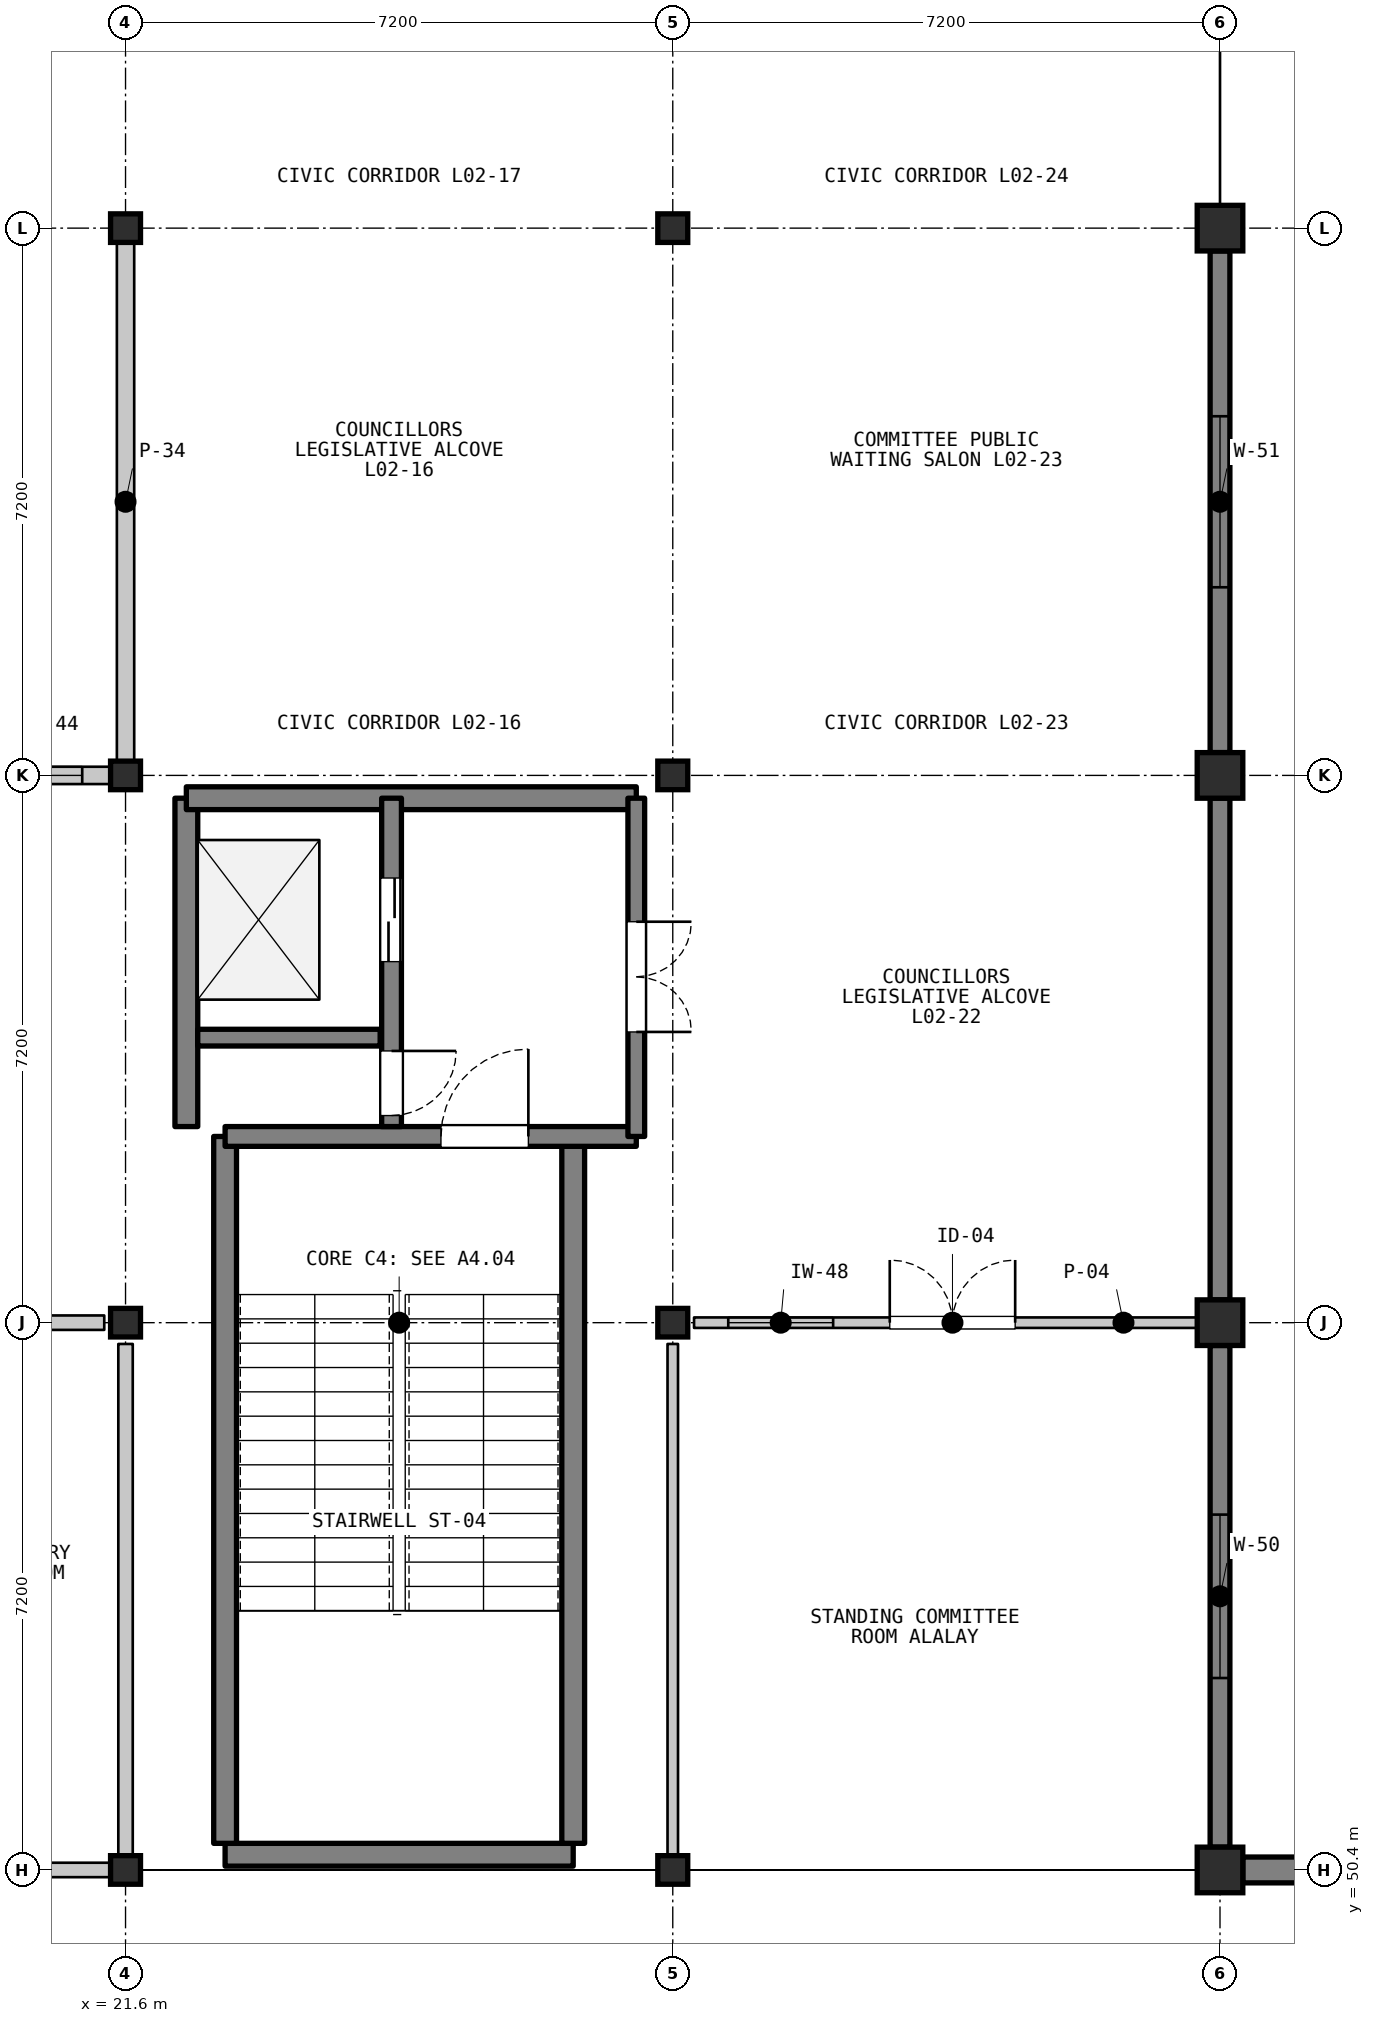
"""IFC4 building model, lengths in metres.
Left out: names, types, materials, properties, quantities, classifications, styles, units other than length and angle.
Written with IfcOpenShell. Run it as: python <this file> out.ifc"""

import sys

from ifc_helpers import new_model, si_unit, direction, frame, frame_2d, origin, origin_2d, place, context, subcontext, project, spatial, rectangle, i_section, extrude, element, fill, save


model = new_model("IFC4")
c1 = context("Model", 3, precision=1e-05, world=origin(), true_north=direction((0.0, 1.0)))
c2 = subcontext(c1, "Body", "Model", "MODEL_VIEW")
j1 = project(units=[si_unit("LENGTHUNIT", "METRE"), si_unit("PLANEANGLEUNIT", "RADIAN")], contexts=[c1])
p1 = place(None, origin())
s1 = spatial("IfcSite", under=j1, at=p1, CompositionType="ELEMENT")
p2 = place(p1, origin())
s2 = spatial("IfcBuilding", under=s1, at=p2, CompositionType="ELEMENT")
p3 = place(p2, frame((0.0, 0.0, 5.4)))
s3 = spatial("IfcBuildingStorey", under=s2, at=p3, CompositionType="ELEMENT", Elevation=5.4)
for number, where, z_axis, x_axis in (
    (1, (21.6, 50.4, 0.0), (0.0, 0.0, 1.0), (1.0, 0.0, 0.0)),
    (2, (21.6, 57.6, 0.0), (0.0, 0.0, 1.0), (1.0, 0.0, 0.0)),
    (3, (21.6, 64.8, 0.0), (0.0, 0.0, 1.0), (1.0, 0.0, 0.0)),
    (4, (21.6, 72.0, 0.0), (0.0, 0.0, 1.0), (1.0, 0.0, 0.0)),
    (5, (28.8, 50.4, 0.0), (0.0, 0.0, 1.0), (1.0, 0.0, 0.0)),
    (6, (28.8, 57.6, 0.0), (0.0, 0.0, 1.0), (1.0, 0.0, 0.0)),
    (7, (28.8, 64.8, 0.0), (0.0, 0.0, 1.0), (1.0, 0.0, 0.0)),
    (8, (28.8, 72.0, 0.0), (0.0, 0.0, 1.0), (1.0, 0.0, 0.0)),
):
    element("IfcColumn", number, at=place(p3, frame(where, z_axis=z_axis, x_axis=x_axis)), inside=s3, PredefinedType="COLUMN", context=c2, shape_type="SweptSolid", body=[
        extrude(i_section(OverallWidth=0.394, OverallDepth=0.376, WebThickness=0.017, FlangeThickness=0.028, FilletRadius=0.015, at=origin_2d()), origin(), (0.0, 0.0, 1.0), 4.5),
    ])
for number, where, z_axis, x_axis in (
    (9, (36.0, 50.4, 0.0), (0.0, 0.0, 1.0), (1.0, 0.0, 0.0)),
    (10, (36.0, 57.6, 0.0), (0.0, 0.0, 1.0), (1.0, 0.0, 0.0)),
    (11, (36.0, 64.8, 0.0), (0.0, 0.0, 1.0), (1.0, 0.0, 0.0)),
    (12, (36.0, 72.0, 0.0), (0.0, 0.0, 1.0), (1.0, 0.0, 0.0)),
):
    element("IfcColumn", number, at=place(p3, frame(where, z_axis=z_axis, x_axis=x_axis)), inside=s3, PredefinedType="COLUMN", context=c2, shape_type="SweptSolid", body=[
        extrude(rectangle(XDim=0.6, YDim=0.6, at=origin_2d()), origin(), (0.0, 0.0, 1.0), 4.5),
    ])
p4 = place(p3, frame((36.0, 57.3, 0.0), z_axis=(0.0, 0.0, 1.0), x_axis=(0.0, -1.0, 0.0)))
e13 = element("IfcWall", 13, at=p4, inside=s3, PredefinedType="SOLIDWALL", context=c2, shape_type="SweptSolid", body=[
    extrude(rectangle(XDim=6.6, YDim=0.26, at=frame_2d((3.3, 0.0))), origin(), (0.0, 0.0, 1.0), 3.767),
])
p5 = place(p4, frame((2.225, 0.0, 0.95)))
e14 = element("IfcOpeningElement", 14, at=p5, cuts=e13, PredefinedType="OPENING", context=c2, shape_type="SweptSolid", body=[
    extrude(rectangle(XDim=2.15, YDim=1.75, at=frame_2d((1.075, 0.875))), frame((0.0, 0.14, 0.0), z_axis=(0.0, -1.0, 0.0), x_axis=(1.0, 0.0, 0.0)), (0.0, 0.0, 1.0), 0.28),
])
p6 = place(p3, frame((36.0, 64.5, 0.0), z_axis=(0.0, 0.0, 1.0), x_axis=(0.0, -1.0, 0.0)))
e15 = element("IfcWall", 15, at=p6, inside=s3, PredefinedType="SOLIDWALL", context=c2, shape_type="SweptSolid", body=[
    extrude(rectangle(XDim=6.6, YDim=0.26, at=frame_2d((3.3, 0.0))), origin(), (0.0, 0.0, 1.0), 3.767),
])
p7 = place(p3, frame((36.0, 71.7, 0.0), z_axis=(0.0, 0.0, 1.0), x_axis=(0.0, -1.0, 0.0)))
e16 = element("IfcWall", 16, at=p7, inside=s3, PredefinedType="SOLIDWALL", context=c2, shape_type="SweptSolid", body=[
    extrude(rectangle(XDim=6.6, YDim=0.26, at=frame_2d((3.3, 0.0))), origin(), (0.0, 0.0, 1.0), 3.767),
])
p8 = place(p7, frame((2.175, 0.0, 0.95)))
e17 = element("IfcOpeningElement", 17, at=p8, cuts=e16, PredefinedType="OPENING", context=c2, shape_type="SweptSolid", body=[
    extrude(rectangle(XDim=2.25, YDim=1.65, at=frame_2d((1.125, 0.825))), frame((0.0, 0.14, 0.0), z_axis=(0.0, -1.0, 0.0), x_axis=(1.0, 0.0, 0.0)), (0.0, 0.0, 1.0), 0.28),
])
p9 = place(p3, frame((36.3, 50.4, 0.0), z_axis=(0.0, 0.0, 1.0), x_axis=(1.0, 0.0, 0.0)))
e18 = element("IfcWall", 18, at=p9, inside=s3, PredefinedType="SOLIDWALL", context=c2, shape_type="SweptSolid", body=[
    extrude(rectangle(XDim=6.65, YDim=0.34, at=frame_2d((3.325, 0.0))), origin(), (0.0, 0.0, 1.0), 3.698),
])
p10 = place(p3, frame((22.91, 50.6, 0.0), z_axis=(0.0, 0.0, 1.0), x_axis=(1.0, 0.0, 0.0)))
e19 = element("IfcWall", 19, at=p10, inside=s3, PredefinedType="SHEAR", context=c2, shape_type="SweptSolid", body=[
    extrude(rectangle(XDim=4.58, YDim=0.3, at=frame_2d((2.29, 0.0))), origin(), (0.0, 0.0, 1.0), 4.3),
])
for number, where, z_axis, x_axis in (
    (20, (22.91, 50.75, 0.0), (0.0, 0.0, 1.0), (0.0, 1.0, 0.0)),
    (21, (27.49, 50.75, 0.0), (0.0, 0.0, 1.0), (0.0, 1.0, 0.0)),
):
    element("IfcWall", number, at=place(p3, frame(where, z_axis=z_axis, x_axis=x_axis)), inside=s3, PredefinedType="SHEAR", context=c2, shape_type="SweptSolid", body=[
        extrude(rectangle(XDim=9.3, YDim=0.3, at=frame_2d((4.65, 0.0))), origin(), (0.0, 0.0, 1.0), 4.3),
    ])
p11 = place(p3, frame((22.91, 60.05, 0.0), z_axis=(0.0, 0.0, 1.0), x_axis=(1.0, 0.0, 0.0)))
e22 = element("IfcWall", 22, at=p11, inside=s3, PredefinedType="SHEAR", context=c2, shape_type="SweptSolid", body=[
    extrude(rectangle(XDim=5.41, YDim=0.26, at=frame_2d((2.705, 0.0))), origin(), (0.0, 0.0, 1.0), 4.3),
])
p12 = place(p11, frame((2.84, 0.0, 0.0)))
e23 = element("IfcOpeningElement", 23, at=p12, cuts=e22, PredefinedType="OPENING", context=c2, shape_type="SweptSolid", body=[
    extrude(rectangle(XDim=1.15, YDim=2.15, at=frame_2d((0.575, 1.075))), frame((0.0, 0.14, 0.0), z_axis=(0.0, -1.0, 0.0), x_axis=(1.0, 0.0, 0.0)), (0.0, 0.0, 1.0), 0.28),
])
p13 = place(p3, frame((22.4, 60.18, 0.0), z_axis=(0.0, 0.0, 1.0), x_axis=(0.0, 1.0, 0.0)))
e24 = element("IfcWall", 24, at=p13, inside=s3, PredefinedType="SHEAR", context=c2, shape_type="SweptSolid", body=[
    extrude(rectangle(XDim=4.32, YDim=0.3, at=frame_2d((2.16, 0.0))), origin(), (0.0, 0.0, 1.0), 4.3),
])
p14 = place(p3, frame((22.4, 64.5, 0.0), z_axis=(0.0, 0.0, 1.0), x_axis=(1.0, 0.0, 0.0)))
e25 = element("IfcWall", 25, at=p14, inside=s3, PredefinedType="SHEAR", context=c2, shape_type="SweptSolid", body=[
    extrude(rectangle(XDim=5.92, YDim=0.3, at=frame_2d((2.96, 0.0))), origin(), (0.0, 0.0, 1.0), 4.3),
])
p15 = place(p3, frame((22.55, 61.35, 0.0), z_axis=(0.0, 0.0, 1.0), x_axis=(1.0, 0.0, 0.0)))
e26 = element("IfcWall", 26, at=p15, inside=s3, PredefinedType="SHEAR", context=c2, shape_type="SweptSolid", body=[
    extrude(rectangle(XDim=2.4, YDim=0.22, at=frame_2d((1.2, 0.0))), origin(), (0.0, 0.0, 1.0), 4.3),
])
p16 = place(p3, frame((25.1, 64.5, 0.0), z_axis=(0.0, 0.0, 1.0), x_axis=(0.0, -1.0, 0.0)))
e27 = element("IfcWall", 27, at=p16, inside=s3, PredefinedType="SHEAR", context=c2, shape_type="SweptSolid", body=[
    extrude(rectangle(XDim=4.32, YDim=0.26, at=frame_2d((2.16, 0.0))), origin(), (0.0, 0.0, 1.0), 4.3),
])
p17 = place(p16, frame((1.05, 0.0, 0.0)))
e28 = element("IfcOpeningElement", 28, at=p17, cuts=e27, PredefinedType="OPENING", context=c2, shape_type="SweptSolid", body=[
    extrude(rectangle(XDim=1.1, YDim=2.15, at=frame_2d((0.55, 1.075))), frame((0.0, 0.14, 0.0), z_axis=(0.0, -1.0, 0.0), x_axis=(1.0, 0.0, 0.0)), (0.0, 0.0, 1.0), 0.28),
])
p18 = place(p16, frame((3.325, 0.0, 0.0)))
e29 = element("IfcOpeningElement", 29, at=p18, cuts=e27, PredefinedType="OPENING", context=c2, shape_type="SweptSolid", body=[
    extrude(rectangle(XDim=0.85, YDim=2.05, at=frame_2d((0.425, 1.025))), frame((0.0, 0.14, 0.0), z_axis=(0.0, -1.0, 0.0), x_axis=(1.0, 0.0, 0.0)), (0.0, 0.0, 1.0), 0.28),
])
p19 = place(p3, frame((28.32, 64.5, 0.0), z_axis=(0.0, 0.0, 1.0), x_axis=(0.0, -1.0, 0.0)))
e30 = element("IfcWall", 30, at=p19, inside=s3, PredefinedType="SHEAR", context=c2, shape_type="SweptSolid", body=[
    extrude(rectangle(XDim=4.45, YDim=0.22, at=frame_2d((2.225, 0.0))), origin(), (0.0, 0.0, 1.0), 4.3),
])
p20 = place(p19, frame((1.625, 0.0, 0.0)))
e31 = element("IfcOpeningElement", 31, at=p20, cuts=e30, PredefinedType="OPENING", context=c2, shape_type="SweptSolid", body=[
    extrude(rectangle(XDim=1.45, YDim=2.2, at=frame_2d((0.725, 1.1))), frame((0.0, 0.12, 0.0), z_axis=(0.0, -1.0, 0.0), x_axis=(1.0, 0.0, 0.0)), (0.0, 0.0, 1.0), 0.24),
])
p21 = place(p3, frame((21.48, 50.4, 0.0), z_axis=(0.0, 0.0, 1.0), x_axis=(-1.0, 0.0, 0.0)))
e32 = element("IfcWall", 32, at=p21, inside=s3, PredefinedType="PARTITIONING", context=c2, shape_type="SweptSolid", body=[
    extrude(rectangle(XDim=3.96, YDim=0.19, at=frame_2d((1.98, 0.0))), origin(), (0.0, 0.0, 1.0), 3.688),
])
p22 = place(p21, frame((1.52, 0.0, 0.0)))
e33 = element("IfcOpeningElement", 33, at=p22, cuts=e32, PredefinedType="OPENING", context=c2, shape_type="SweptSolid", body=[
    extrude(rectangle(XDim=0.92, YDim=2.1, at=frame_2d((0.46, 1.05))), frame((0.0, 0.105, 0.0), z_axis=(0.0, -1.0, 0.0), x_axis=(1.0, 0.0, 0.0)), (0.0, 0.0, 1.0), 0.21),
])
p23 = place(p3, frame((17.52, 57.6, 0.0), z_axis=(0.0, 0.0, 1.0), x_axis=(1.0, 0.0, 0.0)))
e34 = element("IfcWall", 34, at=p23, inside=s3, PredefinedType="PARTITIONING", context=c2, shape_type="SweptSolid", body=[
    extrude(rectangle(XDim=3.8, YDim=0.19, at=frame_2d((1.9, 0.0))), origin(), (0.0, 0.0, 1.0), 3.688),
])
p24 = place(p3, frame((21.6, 57.32, 0.0), z_axis=(0.0, 0.0, 1.0), x_axis=(0.0, -1.0, 0.0)))
e35 = element("IfcWall", 35, at=p24, inside=s3, PredefinedType="PARTITIONING", context=c2, shape_type="SweptSolid", body=[
    extrude(rectangle(XDim=6.8, YDim=0.19, at=frame_2d((3.4, 0.0))), origin(), (0.0, 0.0, 1.0), 3.688),
])
p25 = place(p3, frame((21.48, 64.8, 0.0), z_axis=(0.0, 0.0, 1.0), x_axis=(-1.0, 0.0, 0.0)))
e36 = element("IfcWall", 36, at=p25, inside=s3, PredefinedType="PARTITIONING", context=c2, shape_type="SweptSolid", body=[
    extrude(rectangle(XDim=6.96, YDim=0.228, at=frame_2d((3.48, 0.0))), origin(), (0.0, 0.0, 1.0), 3.688),
])
p26 = place(p25, frame((2.655, 0.0, 0.0)))
e37 = element("IfcOpeningElement", 37, at=p26, cuts=e36, PredefinedType="OPENING", context=c2, shape_type="SweptSolid", body=[
    extrude(rectangle(XDim=1.65, YDim=2.35, at=frame_2d((0.825, 1.175))), frame((0.0, 0.124, 0.0), z_axis=(0.0, -1.0, 0.0), x_axis=(1.0, 0.0, 0.0)), (0.0, 0.0, 1.0), 0.248),
])
p27 = place(p25, frame((0.45, 0.0, 1.05)))
e38 = element("IfcOpeningElement", 38, at=p27, cuts=e36, PredefinedType="OPENING", context=c2, shape_type="SweptSolid", body=[
    extrude(rectangle(XDim=1.88, YDim=1.38, at=frame_2d((0.94, 0.69))), frame((0.0, 0.124, 0.0), z_axis=(0.0, -1.0, 0.0), x_axis=(1.0, 0.0, 0.0)), (0.0, 0.0, 1.0), 0.248),
])
p28 = place(p3, frame((21.6, 71.88, 0.0), z_axis=(0.0, 0.0, 1.0), x_axis=(0.0, -1.0, 0.0)))
e39 = element("IfcWall", 39, at=p28, inside=s3, PredefinedType="PARTITIONING", context=c2, shape_type="SweptSolid", body=[
    extrude(rectangle(XDim=6.96, YDim=0.228, at=frame_2d((3.48, 0.0))), origin(), (0.0, 0.0, 1.0), 3.688),
])
p29 = place(p3, frame((29.08, 57.6, 0.0), z_axis=(0.0, 0.0, 1.0), x_axis=(1.0, 0.0, 0.0)))
e40 = element("IfcWall", 40, at=p29, inside=s3, PredefinedType="PARTITIONING", context=c2, shape_type="SweptSolid", body=[
    extrude(rectangle(XDim=6.8, YDim=0.138, at=frame_2d((3.4, 0.0))), origin(), (0.0, 0.0, 1.0), 3.688),
])
p30 = place(p29, frame((2.575, 0.0, 0.0)))
e41 = element("IfcOpeningElement", 41, at=p30, cuts=e40, PredefinedType="OPENING", context=c2, shape_type="SweptSolid", body=[
    extrude(rectangle(XDim=1.65, YDim=2.35, at=frame_2d((0.825, 1.175))), frame((0.0, 0.079, 0.0), z_axis=(0.0, -1.0, 0.0), x_axis=(1.0, 0.0, 0.0)), (0.0, 0.0, 1.0), 0.158),
])
p31 = place(p29, frame((0.45, 0.0, 1.05)))
e42 = element("IfcOpeningElement", 42, at=p31, cuts=e40, PredefinedType="OPENING", context=c2, shape_type="SweptSolid", body=[
    extrude(rectangle(XDim=1.38, YDim=1.44, at=frame_2d((0.69, 0.72))), frame((0.0, 0.079, 0.0), z_axis=(0.0, -1.0, 0.0), x_axis=(1.0, 0.0, 0.0)), (0.0, 0.0, 1.0), 0.158),
])
p32 = place(p3, frame((28.8, 50.52, 0.0), z_axis=(0.0, 0.0, 1.0), x_axis=(0.0, 1.0, 0.0)))
e43 = element("IfcWall", 43, at=p32, inside=s3, PredefinedType="PARTITIONING", context=c2, shape_type="SweptSolid", body=[
    extrude(rectangle(XDim=6.8, YDim=0.138, at=frame_2d((3.4, 0.0))), origin(), (0.0, 0.0, 1.0), 3.688),
])
p33 = place(p5, origin())
e44 = element("IfcWindow", 44, at=p33, inside=s3, PartitioningType="SINGLE_PANEL", PredefinedType="WINDOW", context=c2, shape_type="SweptSolid", body=[
    extrude(rectangle(XDim=2.15, YDim=1.75, at=frame_2d((1.075, 0.875))), frame((0.0, 0.03, 0.0), z_axis=(0.0, -1.0, 0.0), x_axis=(1.0, 0.0, 0.0)), (0.0, 0.0, 1.0), 0.06),
])
fill(e14, e44)
p34 = place(p8, origin())
e45 = element("IfcWindow", 45, at=p34, inside=s3, PartitioningType="SINGLE_PANEL", PredefinedType="WINDOW", context=c2, shape_type="SweptSolid", body=[
    extrude(rectangle(XDim=2.25, YDim=1.65, at=frame_2d((1.125, 0.825))), frame((0.0, 0.03, 0.0), z_axis=(0.0, -1.0, 0.0), x_axis=(1.0, 0.0, 0.0)), (0.0, 0.0, 1.0), 0.06),
])
fill(e17, e45)
p35 = place(p12, origin())
e46 = element("IfcDoor", 46, at=p35, inside=s3, OperationType="SINGLE_SWING_RIGHT", PredefinedType="DOOR", context=c2, shape_type="SweptSolid", body=[
    extrude(rectangle(XDim=1.15, YDim=2.15, at=frame_2d((0.575, 1.075))), frame((0.0, 0.025, 0.0), z_axis=(0.0, -1.0, 0.0), x_axis=(1.0, 0.0, 0.0)), (0.0, 0.0, 1.0), 0.05),
])
fill(e23, e46)
p36 = place(p17, origin())
e47 = element("IfcDoor", 47, at=p36, inside=s3, OperationType="DOUBLE_DOOR_SLIDING", PredefinedType="DOOR", context=c2, shape_type="SweptSolid", body=[
    extrude(rectangle(XDim=1.1, YDim=2.15, at=frame_2d((0.55, 1.075))), frame((0.0, 0.025, 0.0), z_axis=(0.0, -1.0, 0.0), x_axis=(1.0, 0.0, 0.0)), (0.0, 0.0, 1.0), 0.05),
])
fill(e28, e47)
p37 = place(p18, origin())
e48 = element("IfcDoor", 48, at=p37, inside=s3, OperationType="SINGLE_SWING_LEFT", PredefinedType="DOOR", context=c2, shape_type="SweptSolid", body=[
    extrude(rectangle(XDim=0.85, YDim=2.05, at=frame_2d((0.425, 1.025))), frame((0.0, 0.025, 0.0), z_axis=(0.0, -1.0, 0.0), x_axis=(1.0, 0.0, 0.0)), (0.0, 0.0, 1.0), 0.05),
])
fill(e29, e48)
p38 = place(p20, origin())
e49 = element("IfcDoor", 49, at=p38, inside=s3, OperationType="DOUBLE_DOOR_SINGLE_SWING", PredefinedType="DOOR", context=c2, shape_type="SweptSolid", body=[
    extrude(rectangle(XDim=1.45, YDim=2.2, at=frame_2d((0.725, 1.1))), frame((0.0, 0.025, 0.0), z_axis=(0.0, -1.0, 0.0), x_axis=(1.0, 0.0, 0.0)), (0.0, 0.0, 1.0), 0.05),
])
fill(e31, e49)
p39 = place(p27, origin())
e50 = element("IfcWindow", 50, at=p39, inside=s3, PartitioningType="SINGLE_PANEL", PredefinedType="WINDOW", context=c2, shape_type="SweptSolid", body=[
    extrude(rectangle(XDim=1.88, YDim=1.38, at=frame_2d((0.94, 0.69))), frame((0.0, 0.03, 0.0), z_axis=(0.0, -1.0, 0.0), x_axis=(1.0, 0.0, 0.0)), (0.0, 0.0, 1.0), 0.06),
])
fill(e38, e50)
p40 = place(p30, origin())
e51 = element("IfcDoor", 51, at=p40, inside=s3, OperationType="DOUBLE_DOOR_SINGLE_SWING", PredefinedType="DOOR", context=c2, shape_type="SweptSolid", body=[
    extrude(rectangle(XDim=1.65, YDim=2.35, at=frame_2d((0.825, 1.175))), frame((0.0, 0.025, 0.0), z_axis=(0.0, -1.0, 0.0), x_axis=(1.0, 0.0, 0.0)), (0.0, 0.0, 1.0), 0.05),
])
fill(e41, e51)
p41 = place(p31, origin())
e52 = element("IfcWindow", 52, at=p41, inside=s3, PartitioningType="SINGLE_PANEL", PredefinedType="WINDOW", context=c2, shape_type="SweptSolid", body=[
    extrude(rectangle(XDim=1.38, YDim=1.44, at=frame_2d((0.69, 0.72))), frame((0.0, 0.03, 0.0), z_axis=(0.0, -1.0, 0.0), x_axis=(1.0, 0.0, 0.0)), (0.0, 0.0, 1.0), 0.06),
])
fill(e42, e52)
save(model, sys.argv[1])
